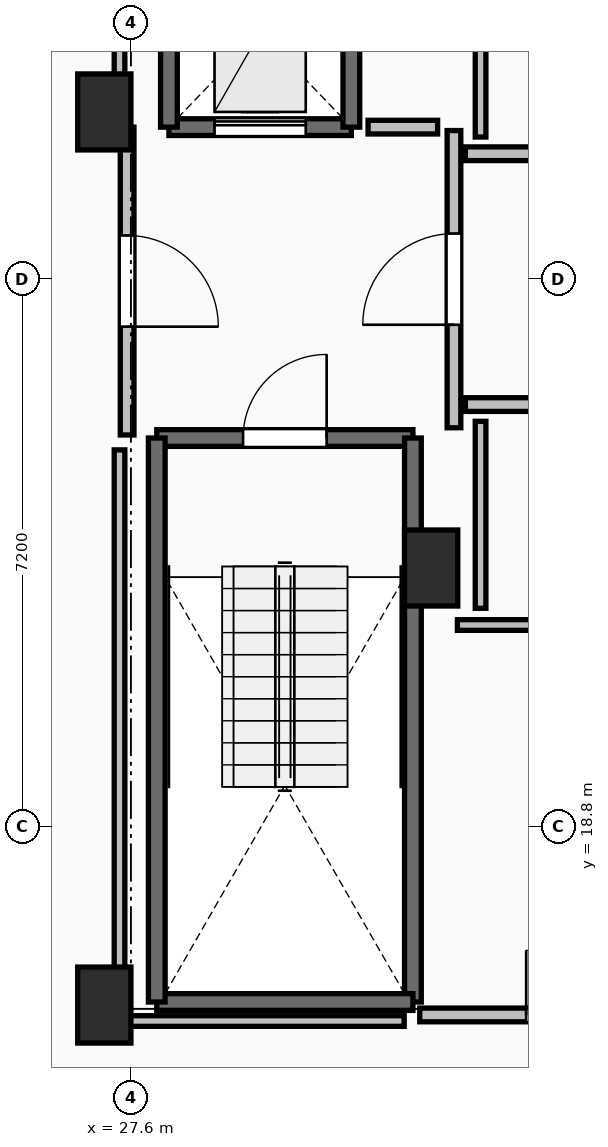
"""IFC4 building model, lengths in metres.
Left out: names, types, materials, properties, quantities, classifications, styles, units other than length and angle.
Written with IfcOpenShell. Run it as: python <this file> out.ifc"""

import sys

from ifc_helpers import new_model, si_unit, direction, frame, frame_2d, origin, origin_2d, place, context, subcontext, project, spatial, rectangle, extrude, element, fill, save


model = new_model("IFC4")
c1 = context("Model", 3, precision=1e-05, world=origin(), true_north=direction((0.0, 1.0)))
c2 = subcontext(c1, "Body", "Model", "MODEL_VIEW")
j1 = project(units=[si_unit("LENGTHUNIT", "METRE"), si_unit("PLANEANGLEUNIT", "RADIAN")], contexts=[c1])
p1 = place(None, origin())
s1 = spatial("IfcSite", under=j1, at=p1, CompositionType="ELEMENT")
p2 = place(p1, origin())
s2 = spatial("IfcBuilding", under=s1, at=p2, CompositionType="ELEMENT")
p3 = place(p2, frame((0.0, 0.0, 259.1)))
s3 = spatial("IfcBuildingStorey", under=s2, at=p3, CompositionType="ELEMENT", Elevation=259.1)
for number, where, z_axis, x_axis in (
    (1, (27.25, 16.45, 0.0), (0.0, 0.0, 1.0), (1.0, 0.0, 0.0)),
    (2, (27.25, 28.2, 0.0), (0.0, 0.0, 1.0), (1.0, 0.0, 0.0)),
    (3, (31.55, 22.2, 0.0), (0.0, 0.0, 1.0), (1.0, 0.0, 0.0)),
):
    element("IfcColumn", number, at=place(p3, frame(where, z_axis=z_axis, x_axis=x_axis)), inside=s3, PredefinedType="PILASTER", context=c2, shape_type="SweptSolid", body=[
        extrude(rectangle(XDim=0.7, YDim=1.0, at=origin_2d()), origin(), (0.0, 0.0, 1.0), 3.55),
    ])
p4 = place(p3, frame((27.94, 23.91, 0.0), z_axis=(0.0, 0.0, 1.0), x_axis=(1.0, 0.0, 0.0)))
e4 = element("IfcWall", 4, at=p4, inside=s3, PredefinedType="SOLIDWALL", context=c2, shape_type="SweptSolid", body=[
    extrude(rectangle(XDim=3.37, YDim=0.22, at=frame_2d((1.685, 0.0))), origin(), (0.0, 0.0, 1.0), 3.29),
])
p5 = place(p4, frame((1.135, 0.0, 0.0)))
e5 = element("IfcOpeningElement", 5, at=p5, cuts=e4, PredefinedType="OPENING", context=c2, shape_type="SweptSolid", body=[
    extrude(rectangle(XDim=1.1, YDim=2.15, at=frame_2d((0.55, 1.075))), frame((0.0, 0.125, 0.0), z_axis=(0.0, -1.0, 0.0), x_axis=(1.0, 0.0, 0.0)), (0.0, 0.0, 1.0), 0.25),
])
p6 = place(p3, frame((31.31, 23.91, 0.0), z_axis=(0.0, 0.0, 1.0), x_axis=(0.0, -1.0, 0.0)))
e6 = element("IfcWall", 6, at=p6, inside=s3, PredefinedType="SOLIDWALL", context=c2, shape_type="SweptSolid", body=[
    extrude(rectangle(XDim=7.42, YDim=0.22, at=frame_2d((3.71, 0.0))), origin(), (0.0, 0.0, 1.0), 3.29),
])
p7 = place(p3, frame((31.31, 16.49, 0.0), z_axis=(0.0, 0.0, 1.0), x_axis=(-1.0, 0.0, 0.0)))
e7 = element("IfcWall", 7, at=p7, inside=s3, PredefinedType="SOLIDWALL", context=c2, shape_type="SweptSolid", body=[
    extrude(rectangle(XDim=3.37, YDim=0.22, at=frame_2d((1.685, 0.0))), origin(), (0.0, 0.0, 1.0), 3.29),
])
p8 = place(p3, frame((27.94, 16.49, 0.0), z_axis=(0.0, 0.0, 1.0), x_axis=(0.0, 1.0, 0.0)))
e8 = element("IfcWall", 8, at=p8, inside=s3, PredefinedType="SOLIDWALL", context=c2, shape_type="SweptSolid", body=[
    extrude(rectangle(XDim=7.42, YDim=0.22, at=frame_2d((3.71, 0.0))), origin(), (0.0, 0.0, 1.0), 3.29),
])
p9 = place(p3, frame((28.1, 28.0, 0.0), z_axis=(0.0, 0.0, 1.0), x_axis=(1.0, 0.0, 0.0)))
e9 = element("IfcWall", 9, at=p9, inside=s3, PredefinedType="SHEAR", context=c2, shape_type="SweptSolid", body=[
    extrude(rectangle(XDim=2.4, YDim=0.22, at=frame_2d((1.2, 0.0))), origin(), (0.0, 0.0, 1.0), 3.29),
])
p10 = place(p9, frame((0.6, 0.0, 0.0)))
e10 = element("IfcOpeningElement", 10, at=p10, cuts=e9, PredefinedType="OPENING", context=c2, shape_type="SweptSolid", body=[
    extrude(rectangle(XDim=1.2, YDim=2.2, at=frame_2d((0.6, 1.1))), frame((0.0, 0.125, 0.0), z_axis=(0.0, -1.0, 0.0), x_axis=(1.0, 0.0, 0.0)), (0.0, 0.0, 1.0), 0.25),
])
for number, where, z_axis, x_axis in (
    (11, (30.5, 28.0, 0.0), (0.0, 0.0, 1.0), (0.0, 1.0, 0.0)),
    (12, (28.1, 30.5, 0.0), (0.0, 0.0, 1.0), (0.0, -1.0, 0.0)),
):
    element("IfcWall", number, at=place(p3, frame(where, z_axis=z_axis, x_axis=x_axis)), inside=s3, PredefinedType="SHEAR", context=c2, shape_type="SweptSolid", body=[
        extrude(rectangle(XDim=2.5, YDim=0.22, at=frame_2d((1.25, 0.0))), origin(), (0.0, 0.0, 1.0), 3.29),
    ])
p11 = place(p3, frame((31.85, 24.045, 0.0), z_axis=(0.0, 0.0, 1.0), x_axis=(0.0, 1.0, 0.0)))
e13 = element("IfcWall", 13, at=p11, inside=s3, PredefinedType="PARTITIONING", context=c2, shape_type="SweptSolid", body=[
    extrude(rectangle(XDim=3.91, YDim=0.18, at=frame_2d((1.955, 0.0))), origin(), (0.0, 0.0, 1.0), 3.29),
])
p12 = place(p11, frame((1.355, 0.0, 0.0)))
e14 = element("IfcOpeningElement", 14, at=p12, cuts=e13, PredefinedType="OPENING", context=c2, shape_type="SweptSolid", body=[
    extrude(rectangle(XDim=1.2, YDim=2.15, at=frame_2d((0.6, 1.075))), frame((0.0, 0.105, 0.0), z_axis=(0.0, -1.0, 0.0), x_axis=(1.0, 0.0, 0.0)), (0.0, 0.0, 1.0), 0.21),
])
p13 = place(p3, frame((27.55, 28.0, 0.0), z_axis=(0.0, 0.0, 1.0), x_axis=(0.0, -1.0, 0.0)))
e15 = element("IfcWall", 15, at=p13, inside=s3, PredefinedType="PARTITIONING", context=c2, shape_type="SweptSolid", body=[
    extrude(rectangle(XDim=4.05, YDim=0.18, at=frame_2d((2.025, 0.0))), origin(), (0.0, 0.0, 1.0), 3.29),
])
p14 = place(p13, frame((1.425, 0.0, 0.0)))
e16 = element("IfcOpeningElement", 16, at=p14, cuts=e15, PredefinedType="OPENING", context=c2, shape_type="SweptSolid", body=[
    extrude(rectangle(XDim=1.2, YDim=2.15, at=frame_2d((0.6, 1.075))), frame((0.0, 0.105, 0.0), z_axis=(0.0, -1.0, 0.0), x_axis=(1.0, 0.0, 0.0)), (0.0, 0.0, 1.0), 0.21),
])
p15 = place(p3, frame((35.04, 27.65, 0.0), z_axis=(0.0, 0.0, 1.0), x_axis=(-1.0, 0.0, 0.0)))
e17 = element("IfcWall", 17, at=p15, inside=s3, PredefinedType="PARTITIONING", context=c2, shape_type="SweptSolid", body=[
    extrude(rectangle(XDim=3.04, YDim=0.18, at=frame_2d((1.52, 0.0))), origin(), (0.0, 0.0, 1.0), 3.29),
])
p16 = place(p15, frame((1.02, 0.0, 0.0)))
e18 = element("IfcOpeningElement", 18, at=p16, cuts=e17, PredefinedType="OPENING", context=c2, shape_type="SweptSolid", body=[
    extrude(rectangle(XDim=1.0, YDim=2.15, at=frame_2d((0.5, 1.075))), frame((0.0, 0.105, 0.0), z_axis=(0.0, -1.0, 0.0), x_axis=(1.0, 0.0, 0.0)), (0.0, 0.0, 1.0), 0.21),
])
p17 = place(p3, frame((32.0, 24.35, 0.0), z_axis=(0.0, 0.0, 1.0), x_axis=(1.0, 0.0, 0.0)))
e19 = element("IfcWall", 19, at=p17, inside=s3, PredefinedType="PARTITIONING", context=c2, shape_type="SweptSolid", body=[
    extrude(rectangle(XDim=6.645, YDim=0.18, at=frame_2d((3.323, 0.0))), origin(), (0.0, 0.0, 1.0), 3.29),
])
p18 = place(p17, frame((2.897, 0.0, 0.0)))
e20 = element("IfcOpeningElement", 20, at=p18, cuts=e19, PredefinedType="OPENING", context=c2, shape_type="SweptSolid", body=[
    extrude(rectangle(XDim=0.85, YDim=2.1, at=frame_2d((0.425, 1.05))), frame((0.0, 0.105, 0.0), z_axis=(0.0, -1.0, 0.0), x_axis=(1.0, 0.0, 0.0)), (0.0, 0.0, 1.0), 0.21),
])
p19 = place(p3, frame((35.05, 21.45, 0.0), z_axis=(0.0, 0.0, 1.0), x_axis=(-1.0, 0.0, 0.0)))
e21 = element("IfcWall", 21, at=p19, inside=s3, PredefinedType="PARTITIONING", context=c2, shape_type="SweptSolid", body=[
    extrude(rectangle(XDim=3.155, YDim=0.14, at=frame_2d((1.578, 0.0))), origin(), (0.0, 0.0, 1.0), 3.29),
])
p20 = place(p3, frame((31.4, 16.32, 0.0), z_axis=(0.0, 0.0, 1.0), x_axis=(1.0, 0.0, 0.0)))
e22 = element("IfcWall", 22, at=p20, inside=s3, PredefinedType="PARTITIONING", context=c2, shape_type="SweptSolid", body=[
    extrude(rectangle(XDim=3.65, YDim=0.18, at=frame_2d((1.825, 0.0))), origin(), (0.0, 0.0, 1.0), 3.29),
])
p21 = place(p20, frame((1.4, 0.0, 0.0)))
e23 = element("IfcOpeningElement", 23, at=p21, cuts=e22, PredefinedType="OPENING", context=c2, shape_type="SweptSolid", body=[
    extrude(rectangle(XDim=0.85, YDim=2.1, at=frame_2d((0.425, 1.05))), frame((0.0, 0.105, 0.0), z_axis=(0.0, -1.0, 0.0), x_axis=(1.0, 0.0, 0.0)), (0.0, 0.0, 1.0), 0.21),
])
p22 = place(p3, frame((31.635, 28.0, 0.0), z_axis=(0.0, 0.0, 1.0), x_axis=(-1.0, 0.0, 0.0)))
e24 = element("IfcWall", 24, at=p22, inside=s3, PredefinedType="PARTITIONING", context=c2, shape_type="SweptSolid", body=[
    extrude(rectangle(XDim=0.915, YDim=0.18, at=frame_2d((0.458, 0.0))), origin(), (0.0, 0.0, 1.0), 3.29),
])
p23 = place(p3, frame((32.2, 30.26, 0.0), z_axis=(0.0, 0.0, 1.0), x_axis=(0.0, -1.0, 0.0)))
e25 = element("IfcWall", 25, at=p23, inside=s3, PredefinedType="PARTITIONING", context=c2, shape_type="SweptSolid", body=[
    extrude(rectangle(XDim=2.39, YDim=0.14, at=frame_2d((1.195, 0.0))), origin(), (0.0, 0.0, 1.0), 3.29),
])
p24 = place(p3, frame((32.2, 24.13, 0.0), z_axis=(0.0, 0.0, 1.0), x_axis=(0.0, -1.0, 0.0)))
e26 = element("IfcWall", 26, at=p24, inside=s3, PredefinedType="PARTITIONING", context=c2, shape_type="SweptSolid", body=[
    extrude(rectangle(XDim=2.46, YDim=0.14, at=frame_2d((1.23, 0.0))), origin(), (0.0, 0.0, 1.0), 2.482),
])
p25 = place(p3, frame((27.45, 33.45, 0.0), z_axis=(0.0, 0.0, 1.0), x_axis=(0.0, -1.0, 0.0)))
e27 = element("IfcWall", 27, at=p25, inside=s3, PredefinedType="PARTITIONING", context=c2, shape_type="SweptSolid", body=[
    extrude(rectangle(XDim=5.254, YDim=0.14, at=frame_2d((2.627, 0.0))), origin(), (0.0, 0.0, 1.0), 2.482),
])
p26 = place(p3, frame((27.45, 23.754, 0.0), z_axis=(0.0, 0.0, 1.0), x_axis=(0.0, -1.0, 0.0)))
e28 = element("IfcWall", 28, at=p26, inside=s3, PredefinedType="PARTITIONING", context=c2, shape_type="SweptSolid", body=[
    extrude(rectangle(XDim=7.514, YDim=0.14, at=frame_2d((3.757, 0.0))), origin(), (0.0, 0.0, 1.0), 2.482),
])
p27 = place(p3, frame((27.45, 16.24, 0.0), z_axis=(0.0, 0.0, 1.0), x_axis=(1.0, 0.0, 0.0)))
e29 = element("IfcWall", 29, at=p27, inside=s3, PredefinedType="PARTITIONING", context=c2, shape_type="SweptSolid", body=[
    extrude(rectangle(XDim=3.745, YDim=0.14, at=frame_2d((1.873, 0.0))), origin(), (0.0, 0.0, 1.0), 2.482),
])
p28 = place(p5, origin())
e30 = element("IfcDoor", 30, at=p28, inside=s3, OperationType="SINGLE_SWING_RIGHT", PredefinedType="DOOR", context=c2, shape_type="SweptSolid", body=[
    extrude(rectangle(XDim=1.1, YDim=2.15, at=frame_2d((0.55, 1.075))), frame((0.0, 0.025, 0.0), z_axis=(0.0, -1.0, 0.0), x_axis=(1.0, 0.0, 0.0)), (0.0, 0.0, 1.0), 0.05),
])
fill(e5, e30)
p29 = place(p10, origin())
e31 = element("IfcDoor", 31, at=p29, inside=s3, OperationType="SLIDING_TO_LEFT", PredefinedType="DOOR", context=c2, shape_type="SweptSolid", body=[
    extrude(rectangle(XDim=1.2, YDim=2.2, at=frame_2d((0.6, 1.1))), frame((0.0, 0.025, 0.0), z_axis=(0.0, -1.0, 0.0), x_axis=(1.0, 0.0, 0.0)), (0.0, 0.0, 1.0), 0.05),
])
fill(e10, e31)
p30 = place(p12, origin())
e32 = element("IfcDoor", 32, at=p30, inside=s3, OperationType="SINGLE_SWING_LEFT", PredefinedType="DOOR", context=c2, shape_type="SweptSolid", body=[
    extrude(rectangle(XDim=1.2, YDim=2.15, at=frame_2d((0.6, 1.075))), frame((0.0, 0.025, 0.0), z_axis=(0.0, -1.0, 0.0), x_axis=(1.0, 0.0, 0.0)), (0.0, 0.0, 1.0), 0.05),
])
fill(e14, e32)
p31 = place(p14, origin())
e33 = element("IfcDoor", 33, at=p31, inside=s3, OperationType="SINGLE_SWING_RIGHT", PredefinedType="DOOR", context=c2, shape_type="SweptSolid", body=[
    extrude(rectangle(XDim=1.2, YDim=2.15, at=frame_2d((0.6, 1.075))), frame((0.0, 0.025, 0.0), z_axis=(0.0, -1.0, 0.0), x_axis=(1.0, 0.0, 0.0)), (0.0, 0.0, 1.0), 0.05),
])
fill(e16, e33)
p32 = place(p21, origin())
e34 = element("IfcDoor", 34, at=p32, inside=s3, OperationType="SINGLE_SWING_LEFT", PredefinedType="DOOR", context=c2, shape_type="SweptSolid", body=[
    extrude(rectangle(XDim=0.85, YDim=2.1, at=frame_2d((0.425, 1.05))), frame((0.0, 0.025, 0.0), z_axis=(0.0, -1.0, 0.0), x_axis=(1.0, 0.0, 0.0)), (0.0, 0.0, 1.0), 0.05),
])
fill(e23, e34)
save(model, sys.argv[1])
